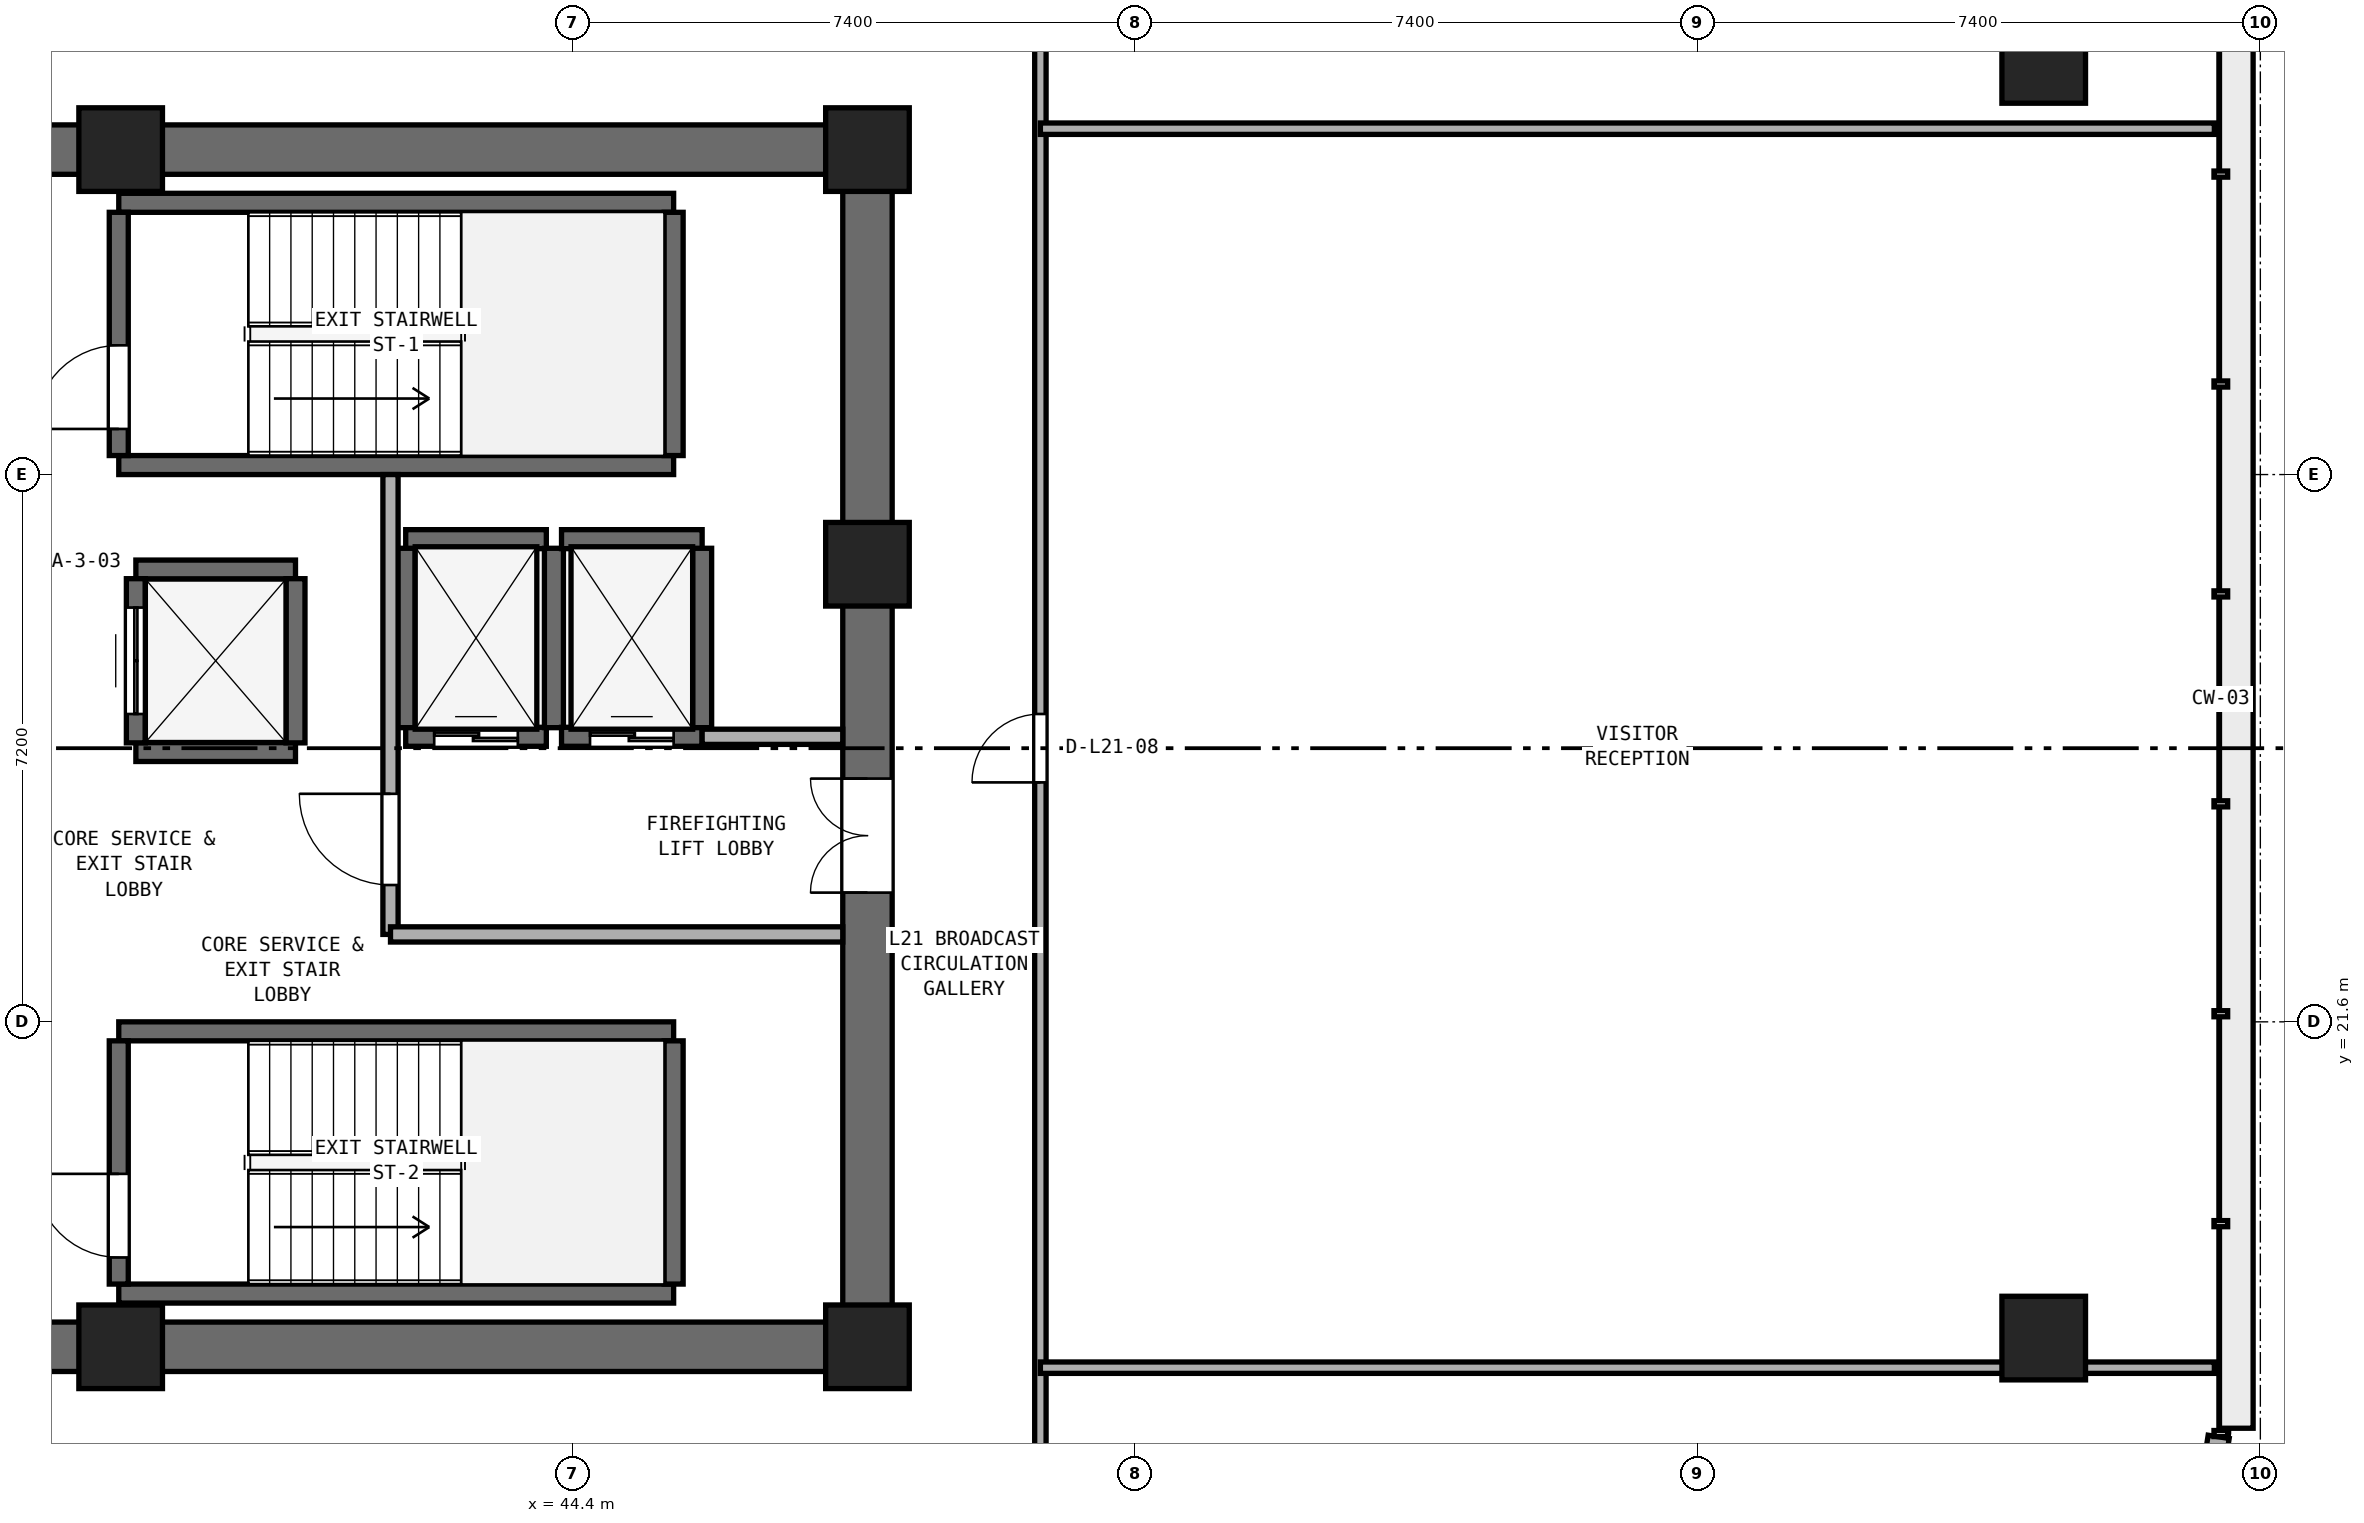
"""IFC4 building model, lengths in metres.
Left out: names, types, materials, properties, quantities, classifications, styles, units other than length and angle.
Written with IfcOpenShell. Run it as: python <this file> out.ifc"""

import sys

from ifc_helpers import new_model, si_unit, direction, frame, frame_2d, origin, origin_2d, place, context, subcontext, project, spatial, rectangle, extrude, element, fill, save


model = new_model("IFC4")
c1 = context("Model", 3, precision=1e-05, world=origin(), true_north=direction((0.0, 1.0)))
c2 = subcontext(c1, "Body", "Model", "MODEL_VIEW")
j1 = project(units=[si_unit("LENGTHUNIT", "METRE"), si_unit("PLANEANGLEUNIT", "RADIAN")], contexts=[c1])
p1 = place(None, origin())
s1 = spatial("IfcSite", under=j1, at=p1, CompositionType="ELEMENT")
p2 = place(p1, origin())
s2 = spatial("IfcBuilding", under=s1, at=p2, CompositionType="ELEMENT")
p3 = place(p2, frame((0.0, 0.0, 85.8)))
s3 = spatial("IfcBuildingStorey", under=s2, at=p3, CompositionType="ELEMENT", Elevation=85.8)
for number, where, z_axis, x_axis in (
    (1, (25.4, 17.325, 0.0), (0.0, 0.0, 1.0), (1.0, 0.0, 0.0)),
    (2, (25.4, 33.075, 0.0), (0.0, 0.0, 1.0), (1.0, 0.0, 0.0)),
):
    element("IfcWall", number, at=place(p3, frame(where, z_axis=z_axis, x_axis=x_axis)), inside=s3, PredefinedType="SHEAR", context=c2, shape_type="SweptSolid", body=[
        extrude(rectangle(XDim=23.2, YDim=0.65, at=frame_2d((11.6, 0.0))), origin(), (0.0, 0.0, 1.0), 3.525),
    ])
p4 = place(p3, frame((48.275, 17.65, 0.0), z_axis=(0.0, 0.0, 1.0), x_axis=(0.0, 1.0, 0.0)))
e3 = element("IfcWall", 3, at=p4, inside=s3, PredefinedType="SHEAR", context=c2, shape_type="SweptSolid", body=[
    extrude(rectangle(XDim=15.1, YDim=0.65, at=frame_2d((7.55, 0.0))), origin(), (0.0, 0.0, 1.0), 3.525),
])
p5 = place(p4, frame((5.65, 0.0, 0.0)))
e4 = element("IfcOpeningElement", 4, at=p5, cuts=e3, PredefinedType="OPENING", context=c2, shape_type="SweptSolid", body=[
    extrude(rectangle(XDim=1.5, YDim=2.15, at=frame_2d((0.75, 1.075))), frame((0.0, 0.335, 0.0), z_axis=(0.0, -1.0, 0.0), x_axis=(1.0, 0.0, 0.0)), (0.0, 0.0, 1.0), 0.67),
])
for number, where, z_axis, x_axis in (
    (5, (38.45, 17.325, 0.0), (0.0, 0.0, 1.0), (1.0, 0.0, 0.0)),
    (6, (48.275, 17.325, 0.0), (0.0, 0.0, 1.0), (1.0, 0.0, 0.0)),
    (7, (48.275, 27.62, 0.0), (0.0, 0.0, 1.0), (1.0, 0.0, 0.0)),
    (8, (48.275, 33.075, 0.0), (0.0, 0.0, 1.0), (1.0, 0.0, 0.0)),
    (9, (38.45, 33.075, 0.0), (0.0, 0.0, 1.0), (1.0, 0.0, 0.0)),
):
    element("IfcColumn", number, at=place(p3, frame(where, z_axis=z_axis, x_axis=x_axis)), inside=s3, PredefinedType="PILASTER", context=c2, shape_type="SweptSolid", body=[
        extrude(rectangle(XDim=1.1, YDim=1.1, at=origin_2d()), origin(), (0.0, 0.0, 1.0), 3.8),
    ])
for number, where, z_axis, x_axis in (
    (10, (63.75, 17.44, 0.0), (0.0, 0.0, 1.0), (1.0, 0.0, 0.0)),
    (11, (63.75, 34.235, 0.0), (0.0, 0.0, 1.0), (1.0, 0.0, 0.0)),
):
    element("IfcColumn", number, at=place(p3, frame(where, z_axis=z_axis, x_axis=x_axis)), inside=s3, PredefinedType="COLUMN", context=c2, shape_type="SweptSolid", body=[
        extrude(rectangle(XDim=1.1, YDim=1.1, at=origin_2d()), origin(), (0.0, 0.0, 1.0), 3.8),
    ])
for number, where, z_axis, x_axis in (
    (12, (38.425, 28.925, 0.0), (0.0, 0.0, 1.0), (1.0, 0.0, 0.0)),
    (13, (38.425, 32.375, 0.0), (0.0, 0.0, 1.0), (1.0, 0.0, 0.0)),
):
    element("IfcWall", number, at=place(p3, frame(where, z_axis=z_axis, x_axis=x_axis)), inside=s3, PredefinedType="SHEAR", context=c2, shape_type="SweptSolid", body=[
        extrude(rectangle(XDim=7.3, YDim=0.25, at=frame_2d((3.65, 0.0))), origin(), (0.0, 0.0, 1.0), 3.525),
    ])
p6 = place(p3, frame((38.425, 29.05, 0.0), z_axis=(0.0, 0.0, 1.0), x_axis=(0.0, 1.0, 0.0)))
e14 = element("IfcWall", 14, at=p6, inside=s3, PredefinedType="SHEAR", context=c2, shape_type="SweptSolid", body=[
    extrude(rectangle(XDim=3.2, YDim=0.25, at=frame_2d((1.6, 0.0))), origin(), (0.0, 0.0, 1.0), 3.525),
])
p7 = place(p6, frame((0.35, 0.0, 0.0)))
e15 = element("IfcOpeningElement", 15, at=p7, cuts=e14, PredefinedType="OPENING", context=c2, shape_type="SweptSolid", body=[
    extrude(rectangle(XDim=1.1, YDim=2.15, at=frame_2d((0.55, 1.075))), frame((0.0, 0.135, 0.0), z_axis=(0.0, -1.0, 0.0), x_axis=(1.0, 0.0, 0.0)), (0.0, 0.0, 1.0), 0.27),
])
p8 = place(p3, frame((45.725, 29.05, 0.0), z_axis=(0.0, 0.0, 1.0), x_axis=(0.0, 1.0, 0.0)))
e16 = element("IfcWall", 16, at=p8, inside=s3, PredefinedType="SHEAR", context=c2, shape_type="SweptSolid", body=[
    extrude(rectangle(XDim=3.2, YDim=0.25, at=frame_2d((1.6, 0.0))), origin(), (0.0, 0.0, 1.0), 3.525),
])
for number, where, z_axis, x_axis in (
    (17, (38.425, 18.025, 0.0), (0.0, 0.0, 1.0), (1.0, 0.0, 0.0)),
    (18, (38.425, 21.475, 0.0), (0.0, 0.0, 1.0), (1.0, 0.0, 0.0)),
):
    element("IfcWall", number, at=place(p3, frame(where, z_axis=z_axis, x_axis=x_axis)), inside=s3, PredefinedType="SHEAR", context=c2, shape_type="SweptSolid", body=[
        extrude(rectangle(XDim=7.3, YDim=0.25, at=frame_2d((3.65, 0.0))), origin(), (0.0, 0.0, 1.0), 3.525),
    ])
p9 = place(p3, frame((38.425, 18.15, 0.0), z_axis=(0.0, 0.0, 1.0), x_axis=(0.0, 1.0, 0.0)))
e19 = element("IfcWall", 19, at=p9, inside=s3, PredefinedType="SHEAR", context=c2, shape_type="SweptSolid", body=[
    extrude(rectangle(XDim=3.2, YDim=0.25, at=frame_2d((1.6, 0.0))), origin(), (0.0, 0.0, 1.0), 3.525),
])
p10 = place(p9, frame((0.35, 0.0, 0.0)))
e20 = element("IfcOpeningElement", 20, at=p10, cuts=e19, PredefinedType="OPENING", context=c2, shape_type="SweptSolid", body=[
    extrude(rectangle(XDim=1.1, YDim=2.15, at=frame_2d((0.55, 1.075))), frame((0.0, 0.135, 0.0), z_axis=(0.0, -1.0, 0.0), x_axis=(1.0, 0.0, 0.0)), (0.0, 0.0, 1.0), 0.27),
])
p11 = place(p3, frame((45.725, 18.15, 0.0), z_axis=(0.0, 0.0, 1.0), x_axis=(0.0, 1.0, 0.0)))
e21 = element("IfcWall", 21, at=p11, inside=s3, PredefinedType="SHEAR", context=c2, shape_type="SweptSolid", body=[
    extrude(rectangle(XDim=3.2, YDim=0.25, at=frame_2d((1.6, 0.0))), origin(), (0.0, 0.0, 1.0), 3.525),
])
p12 = place(p3, frame((42.2, 25.35, 0.0), z_axis=(0.0, 0.0, 1.0), x_axis=(1.0, 0.0, 0.0)))
e22 = element("IfcWall", 22, at=p12, inside=s3, PredefinedType="SHEAR", context=c2, shape_type="SweptSolid", body=[
    extrude(rectangle(XDim=1.85, YDim=0.25, at=frame_2d((0.925, 0.0))), origin(), (0.0, 0.0, 1.0), 3.525),
])
p13 = place(p12, frame((0.375, 0.0, 0.0)))
e23 = element("IfcOpeningElement", 23, at=p13, cuts=e22, PredefinedType="OPENING", context=c2, shape_type="SweptSolid", body=[
    extrude(rectangle(XDim=1.1, YDim=2.15, at=frame_2d((0.55, 1.075))), frame((0.0, 0.135, 0.0), z_axis=(0.0, -1.0, 0.0), x_axis=(1.0, 0.0, 0.0)), (0.0, 0.0, 1.0), 0.27),
])
p14 = place(p3, frame((42.2, 27.95, 0.0), z_axis=(0.0, 0.0, 1.0), x_axis=(1.0, 0.0, 0.0)))
e24 = element("IfcWall", 24, at=p14, inside=s3, PredefinedType="SHEAR", context=c2, shape_type="SweptSolid", body=[
    extrude(rectangle(XDim=1.85, YDim=0.25, at=frame_2d((0.925, 0.0))), origin(), (0.0, 0.0, 1.0), 3.525),
])
for number, where, z_axis, x_axis in (
    (25, (42.2, 25.47, 0.0), (0.0, 0.0, 1.0), (0.0, 1.0, 0.0)),
    (26, (44.15, 25.47, 0.0), (0.0, 0.0, 1.0), (0.0, 1.0, 0.0)),
):
    element("IfcWall", number, at=place(p3, frame(where, z_axis=z_axis, x_axis=x_axis)), inside=s3, PredefinedType="SHEAR", context=c2, shape_type="SweptSolid", body=[
        extrude(rectangle(XDim=2.36, YDim=0.25, at=frame_2d((1.18, 0.0))), origin(), (0.0, 0.0, 1.0), 3.525),
    ])
p15 = place(p3, frame((44.25, 25.35, 0.0), z_axis=(0.0, 0.0, 1.0), x_axis=(1.0, 0.0, 0.0)))
e27 = element("IfcWall", 27, at=p15, inside=s3, PredefinedType="SHEAR", context=c2, shape_type="SweptSolid", body=[
    extrude(rectangle(XDim=1.85, YDim=0.25, at=frame_2d((0.925, 0.0))), origin(), (0.0, 0.0, 1.0), 3.525),
])
p16 = place(p15, frame((0.375, 0.0, 0.0)))
e28 = element("IfcOpeningElement", 28, at=p16, cuts=e27, PredefinedType="OPENING", context=c2, shape_type="SweptSolid", body=[
    extrude(rectangle(XDim=1.1, YDim=2.15, at=frame_2d((0.55, 1.075))), frame((0.0, 0.135, 0.0), z_axis=(0.0, -1.0, 0.0), x_axis=(1.0, 0.0, 0.0)), (0.0, 0.0, 1.0), 0.27),
])
p17 = place(p3, frame((44.25, 27.95, 0.0), z_axis=(0.0, 0.0, 1.0), x_axis=(1.0, 0.0, 0.0)))
e29 = element("IfcWall", 29, at=p17, inside=s3, PredefinedType="SHEAR", context=c2, shape_type="SweptSolid", body=[
    extrude(rectangle(XDim=1.85, YDim=0.25, at=frame_2d((0.925, 0.0))), origin(), (0.0, 0.0, 1.0), 3.525),
])
p18 = place(p3, frame((46.1, 25.47, 0.0), z_axis=(0.0, 0.0, 1.0), x_axis=(0.0, 1.0, 0.0)))
e30 = element("IfcWall", 30, at=p18, inside=s3, PredefinedType="SHEAR", context=c2, shape_type="SweptSolid", body=[
    extrude(rectangle(XDim=2.36, YDim=0.25, at=frame_2d((1.18, 0.0))), origin(), (0.0, 0.0, 1.0), 3.525),
])
for number, where, z_axis, x_axis in (
    (31, (38.65, 25.15, 0.0), (0.0, 0.0, 1.0), (1.0, 0.0, 0.0)),
    (32, (38.65, 27.55, 0.0), (0.0, 0.0, 1.0), (1.0, 0.0, 0.0)),
):
    element("IfcWall", number, at=place(p3, frame(where, z_axis=z_axis, x_axis=x_axis)), inside=s3, PredefinedType="SHEAR", context=c2, shape_type="SweptSolid", body=[
        extrude(rectangle(XDim=2.1, YDim=0.25, at=frame_2d((1.05, 0.0))), origin(), (0.0, 0.0, 1.0), 3.525),
    ])
p19 = place(p3, frame((38.65, 25.27, 0.0), z_axis=(0.0, 0.0, 1.0), x_axis=(0.0, 1.0, 0.0)))
e33 = element("IfcWall", 33, at=p19, inside=s3, PredefinedType="SHEAR", context=c2, shape_type="SweptSolid", body=[
    extrude(rectangle(XDim=2.16, YDim=0.25, at=frame_2d((1.08, 0.0))), origin(), (0.0, 0.0, 1.0), 3.525),
])
p20 = place(p19, frame((0.38, 0.0, 0.0)))
e34 = element("IfcOpeningElement", 34, at=p20, cuts=e33, PredefinedType="OPENING", context=c2, shape_type="SweptSolid", body=[
    extrude(rectangle(XDim=1.4, YDim=2.2, at=frame_2d((0.7, 1.1))), frame((0.0, 0.135, 0.0), z_axis=(0.0, -1.0, 0.0), x_axis=(1.0, 0.0, 0.0)), (0.0, 0.0, 1.0), 0.27),
])
p21 = place(p3, frame((40.75, 25.27, 0.0), z_axis=(0.0, 0.0, 1.0), x_axis=(0.0, 1.0, 0.0)))
e35 = element("IfcWall", 35, at=p21, inside=s3, PredefinedType="SHEAR", context=c2, shape_type="SweptSolid", body=[
    extrude(rectangle(XDim=2.16, YDim=0.25, at=frame_2d((1.08, 0.0))), origin(), (0.0, 0.0, 1.0), 3.525),
])
p22 = place(p3, frame((42.0, 22.75, 0.0), z_axis=(0.0, 0.0, 1.0), x_axis=(0.0, 1.0, 0.0)))
e36 = element("IfcWall", 36, at=p22, inside=s3, PredefinedType="SOLIDWALL", context=c2, shape_type="SweptSolid", body=[
    extrude(rectangle(XDim=6.05, YDim=0.2, at=frame_2d((3.025, 0.0))), origin(), (0.0, 0.0, 1.0), 3.525),
])
p23 = place(p22, frame((0.65, 0.0, 0.0)))
e37 = element("IfcOpeningElement", 37, at=p23, cuts=e36, PredefinedType="OPENING", context=c2, shape_type="SweptSolid", body=[
    extrude(rectangle(XDim=1.2, YDim=2.15, at=frame_2d((0.6, 1.075))), frame((0.0, 0.11, 0.0), z_axis=(0.0, -1.0, 0.0), x_axis=(1.0, 0.0, 0.0)), (0.0, 0.0, 1.0), 0.22),
])
p24 = place(p3, frame((42.0, 22.75, 0.0), z_axis=(0.0, 0.0, 1.0), x_axis=(1.0, 0.0, 0.0)))
e38 = element("IfcWall", 38, at=p24, inside=s3, PredefinedType="SOLIDWALL", context=c2, shape_type="SweptSolid", body=[
    extrude(rectangle(XDim=5.95, YDim=0.2, at=frame_2d((2.975, 0.0))), origin(), (0.0, 0.0, 1.0), 3.525),
])
p25 = place(p3, frame((46.1, 25.35, 0.0), z_axis=(0.0, 0.0, 1.0), x_axis=(1.0, 0.0, 0.0)))
e39 = element("IfcWall", 39, at=p25, inside=s3, PredefinedType="SOLIDWALL", context=c2, shape_type="SweptSolid", body=[
    extrude(rectangle(XDim=1.85, YDim=0.2, at=frame_2d((0.925, 0.0))), origin(), (0.0, 0.0, 1.0), 3.525),
])
p26 = place(p3, frame((50.55, 15.05, 0.0), z_axis=(0.0, 0.0, 1.0), x_axis=(0.0, 1.0, 0.0)))
e40 = element("IfcWall", 40, at=p26, inside=s3, PredefinedType="PARTITIONING", context=c2, shape_type="SweptSolid", body=[
    extrude(rectangle(XDim=20.3, YDim=0.15, at=frame_2d((10.15, 0.0))), origin(), (0.0, 0.0, 1.0), 3.525),
])
p27 = place(p26, frame((9.7, 0.0, 0.0)))
e41 = element("IfcOpeningElement", 41, at=p27, cuts=e40, PredefinedType="OPENING", context=c2, shape_type="SweptSolid", body=[
    extrude(rectangle(XDim=0.9, YDim=2.1, at=frame_2d((0.45, 1.05))), frame((0.0, 0.085, 0.0), z_axis=(0.0, -1.0, 0.0), x_axis=(1.0, 0.0, 0.0)), (0.0, 0.0, 1.0), 0.17),
])
p28 = place(p3, frame((50.55, 17.05, 0.0), z_axis=(0.0, 0.0, 1.0), x_axis=(1.0, 0.0, 0.0)))
e42 = element("IfcWall", 42, at=p28, inside=s3, PredefinedType="PARTITIONING", context=c2, shape_type="SweptSolid", body=[
    extrude(rectangle(XDim=15.445, YDim=0.15, at=frame_2d((7.723, 0.0))), origin(), (0.0, 0.0, 1.0), 3.525),
])
p29 = place(p3, frame((50.55, 33.35, 0.0), z_axis=(0.0, 0.0, 1.0), x_axis=(1.0, 0.0, 0.0)))
e43 = element("IfcWall", 43, at=p29, inside=s3, PredefinedType="PARTITIONING", context=c2, shape_type="SweptSolid", body=[
    extrude(rectangle(XDim=15.445, YDim=0.15, at=frame_2d((7.723, 0.0))), origin(), (0.0, 0.0, 1.0), 2.908),
])
p30 = place(p3, frame((65.867, 14.943, 0.0), z_axis=(0.0, 0.0, 1.0), x_axis=(0.152102600021, 0.988364709541, 0.0)))
e44 = element("IfcWall", 44, at=p30, inside=s3, PredefinedType="STANDARD", context=c2, shape_type="SweptSolid", body=[
    extrude(rectangle(XDim=1.212, YDim=0.28, at=frame_2d((0.606, 0.0))), origin(), (0.0, 0.0, 1.0), 3.525),
])
p31 = place(p7, origin())
e45 = element("IfcDoor", 45, at=p31, inside=s3, OperationType="SINGLE_SWING_LEFT", PredefinedType="DOOR", context=c2, shape_type="SweptSolid", body=[
    extrude(rectangle(XDim=1.1, YDim=2.15, at=frame_2d((0.55, 1.075))), frame((0.0, 0.025, 0.0), z_axis=(0.0, -1.0, 0.0), x_axis=(1.0, 0.0, 0.0)), (0.0, 0.0, 1.0), 0.05),
])
fill(e15, e45)
p32 = place(p10, origin())
e46 = element("IfcDoor", 46, at=p32, inside=s3, OperationType="SINGLE_SWING_RIGHT", PredefinedType="DOOR", context=c2, shape_type="SweptSolid", body=[
    extrude(rectangle(XDim=1.1, YDim=2.15, at=frame_2d((0.55, 1.075))), frame((0.0, 0.025, 0.0), z_axis=(0.0, -1.0, 0.0), x_axis=(1.0, 0.0, 0.0)), (0.0, 0.0, 1.0), 0.05),
])
fill(e20, e46)
p33 = place(p13, origin())
e47 = element("IfcDoor", 47, at=p33, inside=s3, OperationType="DOUBLE_DOOR_SLIDING", PredefinedType="DOOR", context=c2, shape_type="SweptSolid", body=[
    extrude(rectangle(XDim=1.1, YDim=2.15, at=frame_2d((0.55, 1.075))), frame((0.0, 0.025, 0.0), z_axis=(0.0, -1.0, 0.0), x_axis=(1.0, 0.0, 0.0)), (0.0, 0.0, 1.0), 0.05),
])
fill(e23, e47)
p34 = place(p16, origin())
e48 = element("IfcDoor", 48, at=p34, inside=s3, OperationType="DOUBLE_DOOR_SLIDING", PredefinedType="DOOR", context=c2, shape_type="SweptSolid", body=[
    extrude(rectangle(XDim=1.1, YDim=2.15, at=frame_2d((0.55, 1.075))), frame((0.0, 0.025, 0.0), z_axis=(0.0, -1.0, 0.0), x_axis=(1.0, 0.0, 0.0)), (0.0, 0.0, 1.0), 0.05),
])
fill(e28, e48)
p35 = place(p20, origin())
e49 = element("IfcDoor", 49, at=p35, inside=s3, OperationType="DOUBLE_DOOR_SLIDING", PredefinedType="DOOR", context=c2, shape_type="SweptSolid", body=[
    extrude(rectangle(XDim=1.4, YDim=2.2, at=frame_2d((0.7, 1.1))), frame((0.0, 0.025, 0.0), z_axis=(0.0, -1.0, 0.0), x_axis=(1.0, 0.0, 0.0)), (0.0, 0.0, 1.0), 0.05),
])
fill(e34, e49)
p36 = place(p23, origin())
e50 = element("IfcDoor", 50, at=p36, inside=s3, OperationType="SINGLE_SWING_RIGHT", PredefinedType="DOOR", context=c2, shape_type="SweptSolid", body=[
    extrude(rectangle(XDim=1.2, YDim=2.15, at=frame_2d((0.6, 1.075))), frame((0.0, 0.025, 0.0), z_axis=(0.0, -1.0, 0.0), x_axis=(1.0, 0.0, 0.0)), (0.0, 0.0, 1.0), 0.05),
])
fill(e37, e50)
p37 = place(p5, origin())
e51 = element("IfcDoor", 51, at=p37, inside=s3, OperationType="DOUBLE_DOOR_SINGLE_SWING", PredefinedType="DOOR", context=c2, shape_type="SweptSolid", body=[
    extrude(rectangle(XDim=1.5, YDim=2.15, at=frame_2d((0.75, 1.075))), frame((0.0, 0.025, 0.0), z_axis=(0.0, -1.0, 0.0), x_axis=(1.0, 0.0, 0.0)), (0.0, 0.0, 1.0), 0.05),
])
fill(e4, e51)
p38 = place(p27, origin())
e52 = element("IfcDoor", 52, at=p38, inside=s3, OperationType="SINGLE_SWING_LEFT", PredefinedType="DOOR", context=c2, shape_type="SweptSolid", body=[
    extrude(rectangle(XDim=0.9, YDim=2.1, at=frame_2d((0.45, 1.05))), frame((0.0, 0.025, 0.0), z_axis=(0.0, -1.0, 0.0), x_axis=(1.0, 0.0, 0.0)), (0.0, 0.0, 1.0), 0.05),
])
fill(e41, e52)
save(model, sys.argv[1])
